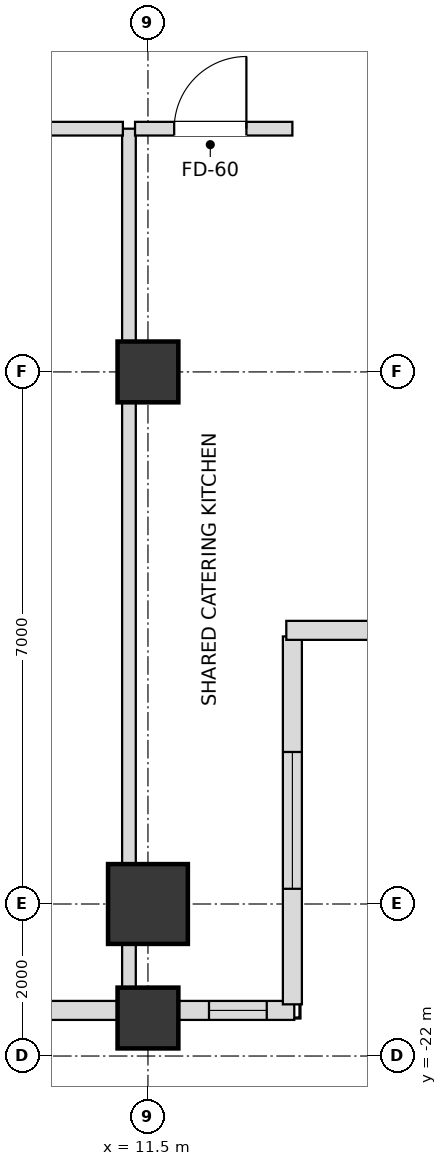
"""IFC4 building model, lengths in metres.
Left out: names, types, materials, properties, quantities, classifications, styles, units other than length and angle.
Written with IfcOpenShell. Run it as: python <this file> out.ifc"""

import sys

from ifc_helpers import new_model, si_unit, direction, frame, frame_2d, origin, origin_2d, place, context, subcontext, project, spatial, rectangle, extrude, element, fill, save


model = new_model("IFC4")
c1 = context("Model", 3, precision=1e-05, world=origin(), true_north=direction((0.0, 1.0)))
c2 = subcontext(c1, "Body", "Model", "MODEL_VIEW")
j1 = project(units=[si_unit("LENGTHUNIT", "METRE"), si_unit("PLANEANGLEUNIT", "RADIAN")], contexts=[c1])
p1 = place(None, origin())
s1 = spatial("IfcSite", under=j1, at=p1, CompositionType="ELEMENT")
p2 = place(p1, origin())
s2 = spatial("IfcBuilding", under=s1, at=p2, CompositionType="ELEMENT")
p3 = place(p2, frame((0.0, 0.0, 205.2)))
s3 = spatial("IfcBuildingStorey", under=s2, at=p3, CompositionType="ELEMENT", Elevation=205.2)
p4 = place(p3, frame((11.5, -20.0, 0.0), z_axis=(0.0, 0.0, 1.0), x_axis=(1.0, 0.0, 0.0)))
e1 = element("IfcColumn", 1, at=p4, inside=s3, PredefinedType="USERDEFINED", context=c2, shape_type="SweptSolid", body=[
    extrude(rectangle(XDim=1.05, YDim=1.05, at=origin_2d()), origin(), (0.0, 0.0, 1.0), 3.6),
])
for number, where, z_axis, x_axis in (
    (2, (11.5, -13.0, 0.0), (0.0, 0.0, 1.0), (1.0, 0.0, 0.0)),
    (3, (11.5, -21.5, 0.0), (0.0, 0.0, 1.0), (1.0, 0.0, 0.0)),
):
    element("IfcColumn", number, at=place(p3, frame(where, z_axis=z_axis, x_axis=x_axis)), inside=s3, PredefinedType="COLUMN", context=c2, shape_type="SweptSolid", body=[
        extrude(rectangle(XDim=0.8, YDim=0.8, at=origin_2d()), origin(), (0.0, 0.0, 1.0), 3.6),
    ])
p5 = place(p3, frame((6.895, -21.4, 0.0), z_axis=(0.0, 0.0, 1.0), x_axis=(1.0, 0.0, 0.0)))
e4 = element("IfcWall", 4, at=p5, inside=s3, PredefinedType="SOLIDWALL", context=c2, shape_type="SweptSolid", body=[
    extrude(rectangle(XDim=4.21, YDim=0.25, at=frame_2d((2.105, 0.0))), origin(), (0.0, 0.0, 1.0), 2.748),
])
p6 = place(p5, frame((1.205, 0.0, 0.72)))
e5 = element("IfcOpeningElement", 5, at=p6, cuts=e4, PredefinedType="OPENING", context=c2, shape_type="SweptSolid", body=[
    extrude(rectangle(XDim=1.8, YDim=1.68, at=frame_2d((0.9, 0.84))), frame((0.0, 0.135, 0.0), z_axis=(0.0, -1.0, 0.0), x_axis=(1.0, 0.0, 0.0)), (0.0, 0.0, 1.0), 0.27),
])
p7 = place(p3, frame((11.895, -21.4, 0.0), z_axis=(0.0, 0.0, 1.0), x_axis=(1.0, 0.0, 0.0)))
e6 = element("IfcWall", 6, at=p7, inside=s3, PredefinedType="SOLIDWALL", context=c2, shape_type="SweptSolid", body=[
    extrude(rectangle(XDim=1.53, YDim=0.25, at=frame_2d((0.765, 0.0))), origin(), (0.0, 0.0, 1.0), 2.748),
])
p8 = place(p7, frame((0.408, 0.0, 0.72)))
e7 = element("IfcOpeningElement", 7, at=p8, cuts=e6, PredefinedType="OPENING", context=c2, shape_type="SweptSolid", body=[
    extrude(rectangle(XDim=0.76, YDim=1.68, at=frame_2d((0.38, 0.84))), frame((0.0, 0.135, 0.0), z_axis=(0.0, -1.0, 0.0), x_axis=(1.0, 0.0, 0.0)), (0.0, 0.0, 1.0), 0.27),
])
p9 = place(p3, frame((13.4, -21.32, 0.0), z_axis=(0.0, 0.0, 1.0), x_axis=(0.0, 1.0, 0.0)))
e8 = element("IfcWall", 8, at=p9, inside=s3, PredefinedType="SOLIDWALL", context=c2, shape_type="SweptSolid", body=[
    extrude(rectangle(XDim=4.84, YDim=0.25, at=frame_2d((2.42, 0.0))), origin(), (0.0, 0.0, 1.0), 2.748),
])
p10 = place(p9, frame((1.52, 0.0, 0.72)))
e9 = element("IfcOpeningElement", 9, at=p10, cuts=e8, PredefinedType="OPENING", context=c2, shape_type="SweptSolid", body=[
    extrude(rectangle(XDim=1.8, YDim=1.68, at=frame_2d((0.9, 0.84))), frame((0.0, 0.135, 0.0), z_axis=(0.0, -1.0, 0.0), x_axis=(1.0, 0.0, 0.0)), (0.0, 0.0, 1.0), 0.27),
])
p11 = place(p3, frame((13.32, -16.4, 0.0), z_axis=(0.0, 0.0, 1.0), x_axis=(1.0, 0.0, 0.0)))
e10 = element("IfcWall", 10, at=p11, inside=s3, PredefinedType="SOLIDWALL", context=c2, shape_type="SweptSolid", body=[
    extrude(rectangle(XDim=5.16, YDim=0.25, at=frame_2d((2.58, 0.0))), origin(), (0.0, 0.0, 1.0), 2.748),
])
p12 = place(p11, frame((1.68, 0.0, 0.72)))
e11 = element("IfcOpeningElement", 11, at=p12, cuts=e10, PredefinedType="OPENING", context=c2, shape_type="SweptSolid", body=[
    extrude(rectangle(XDim=1.8, YDim=1.68, at=frame_2d((0.9, 0.84))), frame((0.0, 0.135, 0.0), z_axis=(0.0, -1.0, 0.0), x_axis=(1.0, 0.0, 0.0)), (0.0, 0.0, 1.0), 0.27),
])
p13 = place(p3, frame((11.25, -21.4, 0.0), z_axis=(0.0, 0.0, 1.0), x_axis=(0.0, 1.0, 0.0)))
e12 = element("IfcWall", 12, at=p13, inside=s3, PredefinedType="PARTITIONING", context=c2, shape_type="SweptSolid", body=[
    extrude(rectangle(XDim=11.6, YDim=0.18, at=frame_2d((5.8, 0.0))), origin(), (0.0, 0.0, 1.0), 2.826),
])
p14 = place(p3, frame((4.93, -9.8, 0.0), z_axis=(0.0, 0.0, 1.0), x_axis=(1.0, 0.0, 0.0)))
e13 = element("IfcWall", 13, at=p14, inside=s3, PredefinedType="PARTITIONING", context=c2, shape_type="SweptSolid", body=[
    extrude(rectangle(XDim=6.24, YDim=0.18, at=frame_2d((3.12, 0.0))), origin(), (0.0, 0.0, 1.0), 2.826),
])
p15 = place(p14, frame((2.645, 0.0, 0.0)))
e14 = element("IfcOpeningElement", 14, at=p15, cuts=e13, PredefinedType="OPENING", context=c2, shape_type="SweptSolid", body=[
    extrude(rectangle(XDim=0.95, YDim=2.15, at=frame_2d((0.475, 1.075))), frame((0.0, 0.1, 0.0), z_axis=(0.0, -1.0, 0.0), x_axis=(1.0, 0.0, 0.0)), (0.0, 0.0, 1.0), 0.2),
])
p16 = place(p3, frame((11.33, -9.8, 0.0), z_axis=(0.0, 0.0, 1.0), x_axis=(1.0, 0.0, 0.0)))
e15 = element("IfcWall", 15, at=p16, inside=s3, PredefinedType="PARTITIONING", context=c2, shape_type="SweptSolid", body=[
    extrude(rectangle(XDim=2.07, YDim=0.18, at=frame_2d((1.035, 0.0))), origin(), (0.0, 0.0, 1.0), 3.38),
])
p17 = place(p16, frame((0.515, 0.0, 0.0)))
e16 = element("IfcOpeningElement", 16, at=p17, cuts=e15, PredefinedType="OPENING", context=c2, shape_type="SweptSolid", body=[
    extrude(rectangle(XDim=0.95, YDim=2.15, at=frame_2d((0.475, 1.075))), frame((0.0, 0.1, 0.0), z_axis=(0.0, -1.0, 0.0), x_axis=(1.0, 0.0, 0.0)), (0.0, 0.0, 1.0), 0.2),
])
p18 = place(p8, origin())
e17 = element("IfcWindow", 17, at=p18, inside=s3, PartitioningType="SINGLE_PANEL", PredefinedType="WINDOW", context=c2, shape_type="SweptSolid", body=[
    extrude(rectangle(XDim=0.76, YDim=1.68, at=frame_2d((0.38, 0.84))), frame((0.0, 0.03, 0.0), z_axis=(0.0, -1.0, 0.0), x_axis=(1.0, 0.0, 0.0)), (0.0, 0.0, 1.0), 0.06),
])
fill(e7, e17)
p19 = place(p10, origin())
e18 = element("IfcWindow", 18, at=p19, inside=s3, PartitioningType="SINGLE_PANEL", PredefinedType="WINDOW", context=c2, shape_type="SweptSolid", body=[
    extrude(rectangle(XDim=1.8, YDim=1.68, at=frame_2d((0.9, 0.84))), frame((0.0, 0.03, 0.0), z_axis=(0.0, -1.0, 0.0), x_axis=(1.0, 0.0, 0.0)), (0.0, 0.0, 1.0), 0.06),
])
fill(e9, e18)
p20 = place(p17, origin())
e19 = element("IfcDoor", 19, at=p20, inside=s3, OperationType="SINGLE_SWING_RIGHT", PredefinedType="DOOR", context=c2, shape_type="SweptSolid", body=[
    extrude(rectangle(XDim=0.95, YDim=2.15, at=frame_2d((0.475, 1.075))), frame((0.0, 0.025, 0.0), z_axis=(0.0, -1.0, 0.0), x_axis=(1.0, 0.0, 0.0)), (0.0, 0.0, 1.0), 0.05),
])
fill(e16, e19)
save(model, sys.argv[1])
